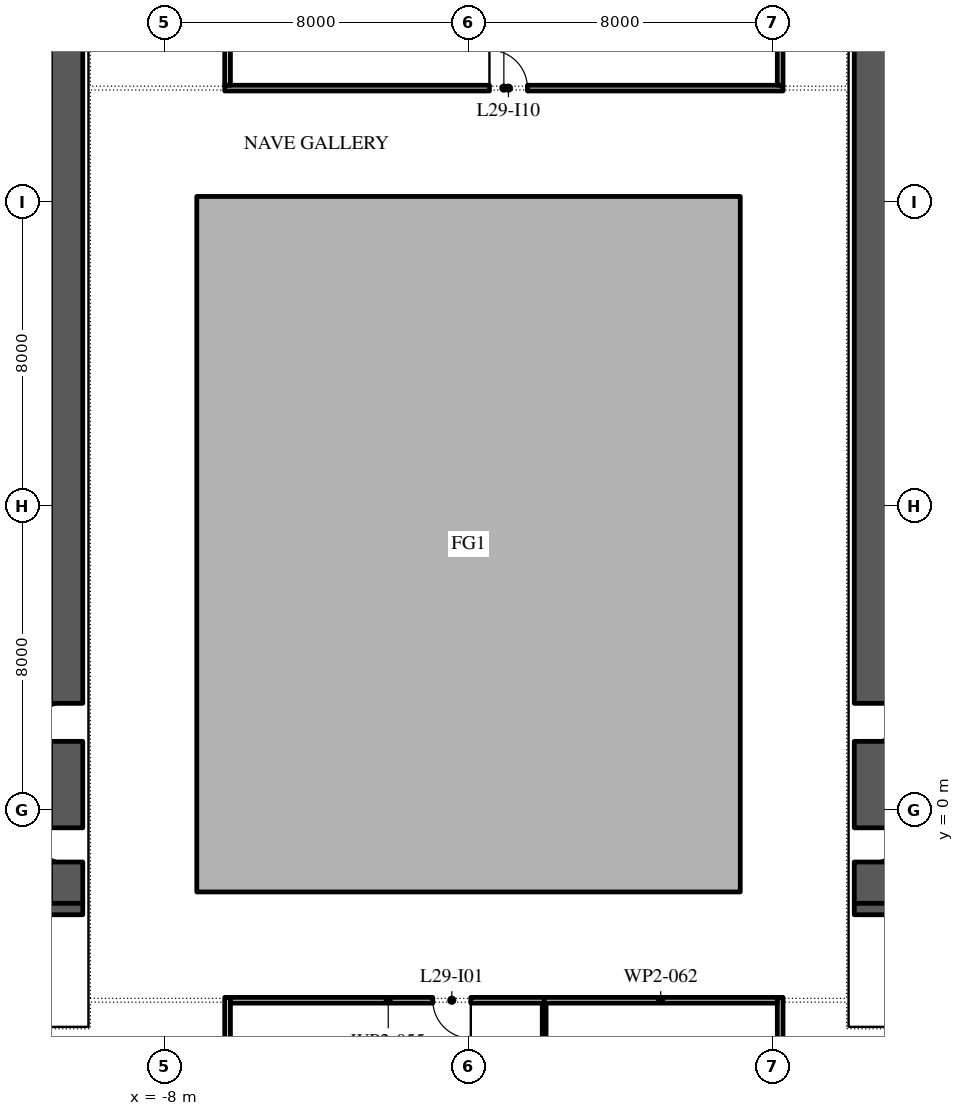
"""IFC4 building model, lengths in metres.
Left out: names, types, materials, properties, quantities, classifications, styles, units other than length and angle.
Written with IfcOpenShell. Run it as: python <this file> out.ifc"""

import sys

from ifc_helpers import new_model, si_unit, direction, frame, frame_2d, origin, place, context, subcontext, project, spatial, polyline, rectangle, outline, extrude, element, fill, save


model = new_model("IFC4")
c1 = context("Model", 3, precision=1e-05, world=origin(), true_north=direction((0.0, 1.0)))
c2 = subcontext(c1, "Body", "Model", "MODEL_VIEW")
j1 = project(units=[si_unit("LENGTHUNIT", "METRE"), si_unit("PLANEANGLEUNIT", "RADIAN")], contexts=[c1])
p1 = place(None, origin())
s1 = spatial("IfcSite", under=j1, at=p1, CompositionType="ELEMENT")
p2 = place(p1, origin())
s2 = spatial("IfcBuilding", under=s1, at=p2, CompositionType="ELEMENT")
p3 = place(p2, frame((0.0, 0.0, 135.0)))
s3 = spatial("IfcBuildingStorey", under=s2, at=p3, CompositionType="ELEMENT", Elevation=135.0)
p4 = place(p3, origin())
e1 = element("IfcWall", 1, at=p4, inside=s3, PredefinedType="STANDARD", context=c2, shape_type="SweptSolid", body=[
    extrude(outline(polyline([(-7.15, -2.15), (7.15, -2.15), (7.15, 16.15), (-7.15, 16.15), (-7.15, -2.15)]), holes=[polyline([(-7.0, -2.0), (-7.0, 16.0), (7.0, 16.0), (7.0, -2.0), (-7.0, -2.0)])]), origin(), (0.0, 0.0, 1.0), 4.0),
])
p5 = place(p3, frame((-10.575, -2.45, 0.0), z_axis=(0.0, 0.0, 1.0), x_axis=(0.0, 1.0, 0.0)))
e2 = element("IfcWall", 2, at=p5, inside=s3, PredefinedType="SHEAR", context=c2, shape_type="SweptSolid", body=[
    extrude(rectangle(XDim=27.9, YDim=0.85, at=frame_2d((13.95, 0.0))), origin(), (0.0, 0.0, 1.0), 4.0),
])
p6 = place(p5, frame((23.65, 0.0, 0.0)))
e3 = element("IfcOpeningElement", 3, at=p6, cuts=e2, PredefinedType="OPENING", context=c2, shape_type="SweptSolid", body=[
    extrude(rectangle(XDim=2.4, YDim=2.1, at=frame_2d((1.2, 1.05))), frame((0.0, 0.435, 0.0), z_axis=(0.0, -1.0, 0.0), x_axis=(1.0, 0.0, 0.0)), (0.0, 0.0, 1.0), 0.87),
])
p7 = place(p5, frame((1.087, 0.0, 0.0)))
e4 = element("IfcOpeningElement", 4, at=p7, cuts=e2, PredefinedType="OPENING", context=c2, shape_type="SweptSolid", body=[
    extrude(rectangle(XDim=0.9, YDim=2.1, at=frame_2d((0.45, 1.05))), frame((0.0, 0.435, 0.0), z_axis=(0.0, -1.0, 0.0), x_axis=(1.0, 0.0, 0.0)), (0.0, 0.0, 1.0), 0.87),
])
p8 = place(p5, frame((4.262, 0.0, 0.0)))
e5 = element("IfcOpeningElement", 5, at=p8, cuts=e2, PredefinedType="OPENING", context=c2, shape_type="SweptSolid", body=[
    extrude(rectangle(XDim=1.0, YDim=2.1, at=frame_2d((0.5, 1.05))), frame((0.0, 0.435, 0.0), z_axis=(0.0, -1.0, 0.0), x_axis=(1.0, 0.0, 0.0)), (0.0, 0.0, 1.0), 0.87),
])
p9 = place(p3, frame((-21.85, -2.6, 0.0), z_axis=(0.0, 0.0, 1.0), x_axis=(1.0, 0.0, 0.0)))
e6 = element("IfcWall", 6, at=p9, inside=s3, PredefinedType="SHEAR", context=c2, shape_type="SweptSolid", body=[
    extrude(rectangle(XDim=11.7, YDim=0.3, at=frame_2d((5.85, 0.0))), origin(), (0.0, 0.0, 1.0), 4.0),
])
p10 = place(p3, frame((10.575, -2.45, 0.0), z_axis=(0.0, 0.0, 1.0), x_axis=(0.0, 1.0, 0.0)))
e7 = element("IfcWall", 7, at=p10, inside=s3, PredefinedType="SHEAR", context=c2, shape_type="SweptSolid", body=[
    extrude(rectangle(XDim=27.9, YDim=0.85, at=frame_2d((13.95, 0.0))), origin(), (0.0, 0.0, 1.0), 4.0),
])
p11 = place(p10, frame((23.65, 0.0, 0.0)))
e8 = element("IfcOpeningElement", 8, at=p11, cuts=e7, PredefinedType="OPENING", context=c2, shape_type="SweptSolid", body=[
    extrude(rectangle(XDim=2.4, YDim=2.1, at=frame_2d((1.2, 1.05))), frame((0.0, 0.435, 0.0), z_axis=(0.0, -1.0, 0.0), x_axis=(1.0, 0.0, 0.0)), (0.0, 0.0, 1.0), 0.87),
])
p12 = place(p10, frame((1.087, 0.0, 0.0)))
e9 = element("IfcOpeningElement", 9, at=p12, cuts=e7, PredefinedType="OPENING", context=c2, shape_type="SweptSolid", body=[
    extrude(rectangle(XDim=0.9, YDim=2.1, at=frame_2d((0.45, 1.05))), frame((0.0, 0.435, 0.0), z_axis=(0.0, -1.0, 0.0), x_axis=(1.0, 0.0, 0.0)), (0.0, 0.0, 1.0), 0.87),
])
p13 = place(p10, frame((4.262, 0.0, 0.0)))
e10 = element("IfcOpeningElement", 10, at=p13, cuts=e7, PredefinedType="OPENING", context=c2, shape_type="SweptSolid", body=[
    extrude(rectangle(XDim=1.0, YDim=2.1, at=frame_2d((0.5, 1.05))), frame((0.0, 0.435, 0.0), z_axis=(0.0, -1.0, 0.0), x_axis=(1.0, 0.0, 0.0)), (0.0, 0.0, 1.0), 0.87),
])
p14 = place(p3, frame((10.15, -2.6, 0.0), z_axis=(0.0, 0.0, 1.0), x_axis=(1.0, 0.0, 0.0)))
e11 = element("IfcWall", 11, at=p14, inside=s3, PredefinedType="SHEAR", context=c2, shape_type="SweptSolid", body=[
    extrude(rectangle(XDim=11.7, YDim=0.3, at=frame_2d((5.85, 0.0))), origin(), (0.0, 0.0, 1.0), 4.0),
])
p15 = place(p3, frame((-6.34, -4.925, 0.0), z_axis=(0.0, 0.0, 1.0), x_axis=(0.0, -1.0, 0.0)))
e12 = element("IfcWall", 12, at=p15, inside=s3, PredefinedType="PARTITIONING", context=c2, shape_type="SweptSolid", body=[
    extrude(rectangle(XDim=2.565, YDim=0.15, at=frame_2d((1.282, 0.0))), origin(), (0.0, 0.0, 1.0), 4.0),
])
p16 = place(p3, frame((-6.415, 19.0, 0.0), z_axis=(0.0, 0.0, 1.0), x_axis=(1.0, 0.0, 0.0)))
e13 = element("IfcWall", 13, at=p16, inside=s3, PredefinedType="PARTITIONING", context=c2, shape_type="SweptSolid", body=[
    extrude(rectangle(XDim=14.69, YDim=0.15, at=frame_2d((7.345, 0.0))), origin(), (0.0, 0.0, 1.0), 4.0),
])
p17 = place(p16, frame((6.965, 0.0, 0.0)))
e14 = element("IfcOpeningElement", 14, at=p17, cuts=e13, PredefinedType="OPENING", context=c2, shape_type="SweptSolid", body=[
    extrude(rectangle(XDim=1.0, YDim=2.1, at=frame_2d((0.5, 1.05))), frame((0.0, 0.085, 0.0), z_axis=(0.0, -1.0, 0.0), x_axis=(1.0, 0.0, 0.0)), (0.0, 0.0, 1.0), 0.17),
])
p18 = place(p3, frame((-6.34, 23.46, 0.0), z_axis=(0.0, 0.0, 1.0), x_axis=(0.0, -1.0, 0.0)))
e15 = element("IfcWall", 15, at=p18, inside=s3, PredefinedType="PARTITIONING", context=c2, shape_type="SweptSolid", body=[
    extrude(rectangle(XDim=4.385, YDim=0.15, at=frame_2d((2.192, 0.0))), origin(), (0.0, 0.0, 1.0), 4.0),
])
p19 = place(p3, frame((2.04, -5.0, 0.0), z_axis=(0.0, 0.0, 1.0), x_axis=(-1.0, 0.0, 0.0)))
e16 = element("IfcWall", 16, at=p19, inside=s3, PredefinedType="PARTITIONING", context=c2, shape_type="SweptSolid", body=[
    extrude(rectangle(XDim=8.305, YDim=0.15, at=frame_2d((4.152, 0.0))), origin(), (0.0, 0.0, 1.0), 4.0),
])
p20 = place(p19, frame((1.98, 0.0, 0.0)))
e17 = element("IfcOpeningElement", 17, at=p20, cuts=e16, PredefinedType="OPENING", context=c2, shape_type="SweptSolid", body=[
    extrude(rectangle(XDim=1.0, YDim=2.1, at=frame_2d((0.5, 1.05))), frame((0.0, 0.085, 0.0), z_axis=(0.0, -1.0, 0.0), x_axis=(1.0, 0.0, 0.0)), (0.0, 0.0, 1.0), 0.17),
])
p21 = place(p3, frame((1.99, -5.075, 0.0), z_axis=(0.0, 0.0, 1.0), x_axis=(0.0, -1.0, 0.0)))
e18 = element("IfcWall", 18, at=p21, inside=s3, PredefinedType="PARTITIONING", context=c2, shape_type="SweptSolid", body=[
    extrude(rectangle(XDim=5.875, YDim=0.1, at=frame_2d((2.938, 0.0))), origin(), (0.0, 0.0, 1.0), 4.0),
])
p22 = place(p3, frame((8.2, -7.575, 0.0), z_axis=(0.0, 0.0, 1.0), x_axis=(0.0, 1.0, 0.0)))
e19 = element("IfcWall", 19, at=p22, inside=s3, PredefinedType="PARTITIONING", context=c2, shape_type="SweptSolid", body=[
    extrude(rectangle(XDim=2.65, YDim=0.15, at=frame_2d((1.325, 0.0))), origin(), (0.0, 0.0, 1.0), 4.0),
])
p23 = place(p3, frame((8.125, -5.0, 0.0), z_axis=(0.0, 0.0, 1.0), x_axis=(-1.0, 0.0, 0.0)))
e20 = element("IfcWall", 20, at=p23, inside=s3, PredefinedType="PARTITIONING", context=c2, shape_type="SweptSolid", body=[
    extrude(rectangle(XDim=6.135, YDim=0.15, at=frame_2d((3.067, 0.0))), origin(), (0.0, 0.0, 1.0), 4.0),
])
p24 = place(p3, frame((8.2, 19.075, 0.0), z_axis=(0.0, 0.0, 1.0), x_axis=(0.0, 1.0, 0.0)))
e21 = element("IfcWall", 21, at=p24, inside=s3, PredefinedType="PARTITIONING", context=c2, shape_type="SweptSolid", body=[
    extrude(rectangle(XDim=4.285, YDim=0.15, at=frame_2d((2.143, 0.0))), origin(), (0.0, 0.0, 1.0), 4.0),
])
p25 = place(p7, origin())
e22 = element("IfcDoor", 22, at=p25, inside=s3, OperationType="SINGLE_SWING_LEFT", PredefinedType="DOOR", context=c2, shape_type="SweptSolid", body=[
    extrude(rectangle(XDim=0.9, YDim=2.1, at=frame_2d((0.45, 1.05))), frame((0.0, 0.425, 0.0), z_axis=(0.0, -1.0, 0.0), x_axis=(1.0, 0.0, 0.0)), (0.0, 0.0, 1.0), 0.05),
])
fill(e4, e22)
p26 = place(p8, origin())
e23 = element("IfcDoor", 23, at=p26, inside=s3, OperationType="SINGLE_SWING_RIGHT", PredefinedType="DOOR", context=c2, shape_type="SweptSolid", body=[
    extrude(rectangle(XDim=1.0, YDim=2.1, at=frame_2d((0.5, 1.05))), frame((0.0, 0.425, 0.0), z_axis=(0.0, -1.0, 0.0), x_axis=(1.0, 0.0, 0.0)), (0.0, 0.0, 1.0), 0.05),
])
fill(e5, e23)
p27 = place(p12, frame((0.9, -0.8, 0.0), z_axis=(0.0, 0.0, 1.0), x_axis=(-1.0, 0.0, 0.0)))
e24 = element("IfcDoor", 24, at=p27, inside=s3, OperationType="SINGLE_SWING_RIGHT", PredefinedType="DOOR", context=c2, shape_type="SweptSolid", body=[
    extrude(rectangle(XDim=0.9, YDim=2.1, at=frame_2d((0.45, 1.05))), frame((0.0, -0.375, 0.0), z_axis=(0.0, -1.0, 0.0), x_axis=(1.0, 0.0, 0.0)), (0.0, 0.0, 1.0), 0.05),
])
fill(e9, e24)
p28 = place(p13, frame((1.0, -0.8, 0.0), z_axis=(0.0, 0.0, 1.0), x_axis=(-1.0, 0.0, 0.0)))
e25 = element("IfcDoor", 25, at=p28, inside=s3, OperationType="SINGLE_SWING_RIGHT", PredefinedType="DOOR", context=c2, shape_type="SweptSolid", body=[
    extrude(rectangle(XDim=1.0, YDim=2.1, at=frame_2d((0.5, 1.05))), frame((0.0, -0.375, 0.0), z_axis=(0.0, -1.0, 0.0), x_axis=(1.0, 0.0, 0.0)), (0.0, 0.0, 1.0), 0.05),
])
fill(e10, e25)
p29 = place(p20, origin())
e26 = element("IfcDoor", 26, at=p29, inside=s3, OperationType="SINGLE_SWING_RIGHT", PredefinedType="DOOR", context=c2, shape_type="SweptSolid", body=[
    extrude(rectangle(XDim=1.0, YDim=2.1, at=frame_2d((0.5, 1.05))), frame((0.0, 0.025, 0.0), z_axis=(0.0, -1.0, 0.0), x_axis=(1.0, 0.0, 0.0)), (0.0, 0.0, 1.0), 0.05),
])
fill(e17, e26)
p30 = place(p17, origin())
e27 = element("IfcDoor", 27, at=p30, inside=s3, OperationType="SINGLE_SWING_RIGHT", PredefinedType="DOOR", context=c2, shape_type="SweptSolid", body=[
    extrude(rectangle(XDim=1.0, YDim=2.1, at=frame_2d((0.5, 1.05))), frame((0.0, 0.025, 0.0), z_axis=(0.0, -1.0, 0.0), x_axis=(1.0, 0.0, 0.0)), (0.0, 0.0, 1.0), 0.05),
])
fill(e14, e27)
save(model, sys.argv[1])
